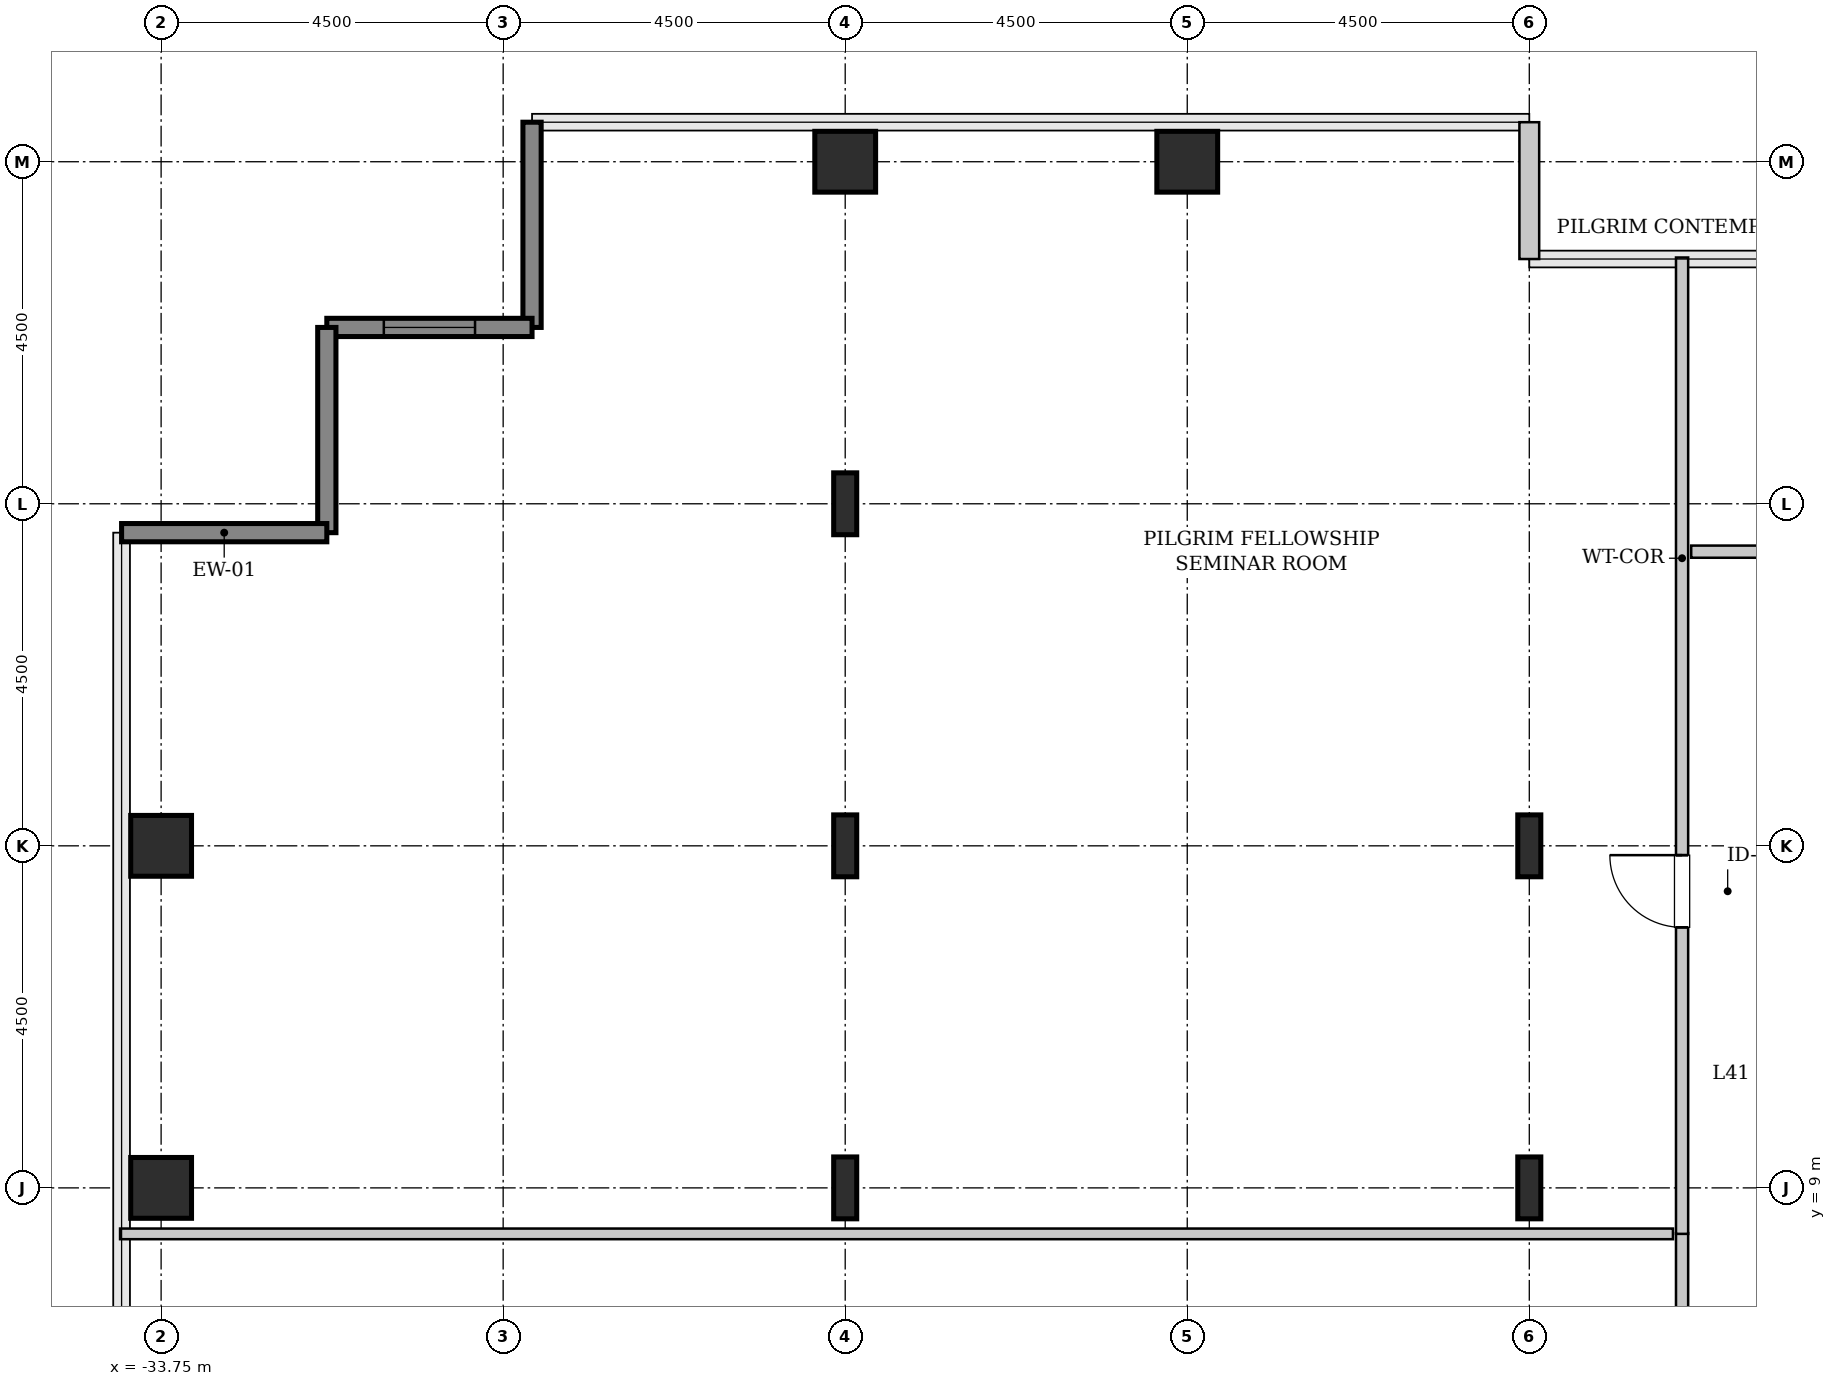
"""IFC4 building model, lengths in metres.
Left out: names, types, materials, properties, quantities, classifications, styles, units other than length and angle.
Written with IfcOpenShell. Run it as: python <this file> out.ifc"""

import sys

from ifc_helpers import new_model, si_unit, direction, frame, frame_2d, origin, origin_2d, place, context, subcontext, project, spatial, rectangle, hollow_rectangle, i_section, extrude, source, transform, mapped, element, fill, save


model = new_model("IFC4")
c1 = context("Model", 3, precision=1e-05, world=origin(), true_north=direction((0.0, 1.0)))
c2 = subcontext(c1, "Body", "Model", "MODEL_VIEW")
j1 = project(units=[si_unit("LENGTHUNIT", "METRE"), si_unit("PLANEANGLEUNIT", "RADIAN")], contexts=[c1])
p1 = place(None, origin())
s1 = spatial("IfcSite", under=j1, at=p1, CompositionType="ELEMENT")
p2 = place(p1, origin())
s2 = spatial("IfcBuilding", under=s1, at=p2, CompositionType="ELEMENT")
p3 = place(p2, frame((0.0, 0.0, 167.8)))
s3 = spatial("IfcBuildingStorey", under=s2, at=p3, CompositionType="ELEMENT", Elevation=167.8)
m1 = source(origin(), c2, "Body", "SweptSolid", [
    extrude(hollow_rectangle(XDim=0.8, YDim=0.8, WallThickness=0.04, InnerFilletRadius=0.04, OuterFilletRadius=0.08, at=origin_2d()), origin(), (0.0, 0.0, 1.0), 3.8),
])
for number, where, z_axis, x_axis in (
    (1, (-33.75, 9.0, 0.0), (0.0, 0.0, 1.0), (1.0, 0.0, 0.0)),
    (2, (-33.75, 13.5, 0.0), (0.0, 0.0, 1.0), (1.0, 0.0, 0.0)),
):
    element("IfcColumn", number, at=place(p3, frame(where, z_axis=z_axis, x_axis=x_axis)), inside=s3, PredefinedType="COLUMN", context=c2, shape_type="MappedRepresentation", body=[
        mapped(m1, transform((0.0, 0.0, 0.0), x_axis=(1.0, 0.0, 0.0), y_axis=(0.0, 1.0, 0.0), z_axis=(0.0, 0.0, 1.0), scale=1.0)),
    ])
m2 = source(origin(), c2, "Body", "SweptSolid", [
    extrude(i_section(OverallWidth=0.303, OverallDepth=0.814, WebThickness=0.021, FlangeThickness=0.04, FilletRadius=0.03, at=origin_2d()), origin(), (0.0, 0.0, 1.0), 3.8),
])
for number, where, z_axis, x_axis in (
    (3, (-24.75, 9.0, 0.0), (0.0, 0.0, 1.0), (1.0, 0.0, 0.0)),
    (4, (-24.75, 13.5, 0.0), (0.0, 0.0, 1.0), (1.0, 0.0, 0.0)),
    (5, (-24.75, 18.0, 0.0), (0.0, 0.0, 1.0), (1.0, 0.0, 0.0)),
):
    element("IfcColumn", number, at=place(p3, frame(where, z_axis=z_axis, x_axis=x_axis)), inside=s3, PredefinedType="COLUMN", context=c2, shape_type="MappedRepresentation", body=[
        mapped(m2, transform((0.0, 0.0, 0.0), x_axis=(1.0, 0.0, 0.0), y_axis=(0.0, 1.0, 0.0), z_axis=(0.0, 0.0, 1.0), scale=1.0)),
    ])
for number, where, z_axis, x_axis in (
    (6, (-24.75, 22.5, 0.0), (0.0, 0.0, 1.0), (1.0, 0.0, 0.0)),
    (7, (-20.25, 22.5, 0.0), (0.0, 0.0, 1.0), (1.0, 0.0, 0.0)),
):
    element("IfcColumn", number, at=place(p3, frame(where, z_axis=z_axis, x_axis=x_axis)), inside=s3, PredefinedType="COLUMN", context=c2, shape_type="MappedRepresentation", body=[
        mapped(m1, transform((0.0, 0.0, 0.0), x_axis=(1.0, 0.0, 0.0), y_axis=(0.0, 1.0, 0.0), z_axis=(0.0, 0.0, 1.0), scale=1.0)),
    ])
for number, where, z_axis, x_axis in (
    (8, (-15.75, 9.0, 0.0), (0.0, 0.0, 1.0), (1.0, 0.0, 0.0)),
    (9, (-15.75, 13.5, 0.0), (0.0, 0.0, 1.0), (1.0, 0.0, 0.0)),
):
    element("IfcColumn", number, at=place(p3, frame(where, z_axis=z_axis, x_axis=x_axis)), inside=s3, PredefinedType="COLUMN", context=c2, shape_type="MappedRepresentation", body=[
        mapped(m2, transform((0.0, 0.0, 0.0), x_axis=(1.0, 0.0, 0.0), y_axis=(0.0, 1.0, 0.0), z_axis=(0.0, 0.0, 1.0), scale=1.0)),
    ])
m3 = source(origin(), c2, "Body", "SweptSolid", [
    extrude(rectangle(XDim=1.8, YDim=0.26, at=frame_2d((0.9, 0.0))), origin(), (0.0, 0.0, 1.0), 3.55),
])
p4 = place(p3, frame((-15.75, 21.22, 0.0), z_axis=(0.0, 0.0, 1.0), x_axis=(0.0, 1.0, 0.0)))
e10 = element("IfcWall", 10, at=p4, inside=s3, PredefinedType="SOLIDWALL", context=c2, shape_type="MappedRepresentation", body=[
    mapped(m3, transform((0.0, 0.0, 0.0), x_axis=(1.0, 0.0, 0.0), y_axis=(0.0, 1.0, 0.0), z_axis=(0.0, 0.0, 1.0), scale=1.0)),
])
m4 = source(origin(), c2, "Body", "SweptSolid", [
    extrude(rectangle(XDim=2.7, YDim=0.24, at=frame_2d((1.35, 0.0))), origin(), (0.0, 0.0, 1.0), 3.55),
])
p5 = place(p3, frame((-28.87, 23.02, 0.0), z_axis=(0.0, 0.0, 1.0), x_axis=(0.0, -1.0, 0.0)))
e11 = element("IfcWall", 11, at=p5, inside=s3, PredefinedType="SHEAR", context=c2, shape_type="MappedRepresentation", body=[
    mapped(m4, transform((0.0, 0.0, 0.0), x_axis=(1.0, 0.0, 0.0), y_axis=(0.0, 1.0, 0.0), z_axis=(0.0, 0.0, 1.0), scale=1.0)),
])
p6 = place(p3, frame((-28.87, 20.32, 0.0), z_axis=(0.0, 0.0, 1.0), x_axis=(-1.0, 0.0, 0.0)))
e12 = element("IfcWall", 12, at=p6, inside=s3, PredefinedType="SHEAR", context=c2, shape_type="MappedRepresentation", body=[
    mapped(m4, transform((0.0, 0.0, 0.0), x_axis=(1.0, 0.0, 0.0), y_axis=(0.0, 1.0, 0.0), z_axis=(0.0, 0.0, 1.0), scale=1.0)),
])
p7 = place(p6, frame((0.75, 0.0, 0.85)))
e13 = element("IfcOpeningElement", 13, at=p7, cuts=e12, PredefinedType="OPENING", context=c2, shape_type="SweptSolid", body=[
    extrude(rectangle(XDim=1.2, YDim=1.8, at=frame_2d((0.6, 0.9))), frame((0.0, 0.13, 0.0), z_axis=(0.0, -1.0, 0.0), x_axis=(1.0, 0.0, 0.0)), (0.0, 0.0, 1.0), 0.26),
])
for number, where, z_axis, x_axis in (
    (14, (-31.57, 20.32, 0.0), (0.0, 0.0, 1.0), (0.0, -1.0, 0.0)),
    (15, (-31.57, 17.62, 0.0), (0.0, 0.0, 1.0), (-1.0, 0.0, 0.0)),
):
    element("IfcWall", number, at=place(p3, frame(where, z_axis=z_axis, x_axis=x_axis)), inside=s3, PredefinedType="SHEAR", context=c2, shape_type="MappedRepresentation", body=[
        mapped(m4, transform((0.0, 0.0, 0.0), x_axis=(1.0, 0.0, 0.0), y_axis=(0.0, 1.0, 0.0), z_axis=(0.0, 0.0, 1.0), scale=1.0)),
    ])
m5 = source(origin(), c2, "Body", "SweptSolid", [
    extrude(rectangle(XDim=3.61, YDim=0.16, at=frame_2d((1.805, 0.0))), origin(), (0.0, 0.0, 1.0), 3.535),
])
p8 = place(p3, frame((-13.74, 4.795, 0.0), z_axis=(0.0, 0.0, 1.0), x_axis=(0.0, 1.0, 0.0)))
e16 = element("IfcWall", 16, at=p8, inside=s3, PredefinedType="PARTITIONING", context=c2, shape_type="MappedRepresentation", body=[
    mapped(m5, transform((0.0, 0.0, 0.0), x_axis=(1.0, 0.0, 0.0), y_axis=(0.0, 1.0, 0.0), z_axis=(0.0, 0.0, 1.0), scale=1.0)),
])
p9 = place(p8, frame((1.33, 0.0, 0.0)))
e17 = element("IfcOpeningElement", 17, at=p9, cuts=e16, PredefinedType="OPENING", context=c2, shape_type="SweptSolid", body=[
    extrude(rectangle(XDim=0.95, YDim=2.1, at=frame_2d((0.475, 1.05))), frame((0.0, 0.09, 0.0), z_axis=(0.0, -1.0, 0.0), x_axis=(1.0, 0.0, 0.0)), (0.0, 0.0, 1.0), 0.18),
])
m6 = source(origin(), c2, "Body", "SweptSolid", [
    extrude(rectangle(XDim=20.43, YDim=0.14, at=frame_2d((10.215, 0.0))), origin(), (0.0, 0.0, 1.0), 3.535),
])
p10 = place(p3, frame((-34.29, 8.395, 0.0), z_axis=(0.0, 0.0, 1.0), x_axis=(1.0, 0.0, 0.0)))
e18 = element("IfcWall", 18, at=p10, inside=s3, PredefinedType="PARTITIONING", context=c2, shape_type="MappedRepresentation", body=[
    mapped(m6, transform((0.0, 0.0, 0.0), x_axis=(1.0, 0.0, 0.0), y_axis=(0.0, 1.0, 0.0), z_axis=(0.0, 0.0, 1.0), scale=1.0)),
])
m7 = source(origin(), c2, "Body", "SweptSolid", [
    extrude(rectangle(XDim=12.845, YDim=0.16, at=frame_2d((6.422, 0.0))), origin(), (0.0, 0.0, 1.0), 3.535),
])
p11 = place(p3, frame((-13.74, 8.395, 0.0), z_axis=(0.0, 0.0, 1.0), x_axis=(0.0, 1.0, 0.0)))
e19 = element("IfcWall", 19, at=p11, inside=s3, PredefinedType="PARTITIONING", context=c2, shape_type="MappedRepresentation", body=[
    mapped(m7, transform((0.0, 0.0, 0.0), x_axis=(1.0, 0.0, 0.0), y_axis=(0.0, 1.0, 0.0), z_axis=(0.0, 0.0, 1.0), scale=1.0)),
])
p12 = place(p11, frame((4.032, 0.0, 0.0)))
e20 = element("IfcOpeningElement", 20, at=p12, cuts=e19, PredefinedType="OPENING", context=c2, shape_type="SweptSolid", body=[
    extrude(rectangle(XDim=0.95, YDim=2.1, at=frame_2d((0.475, 1.05))), frame((0.0, 0.09, 0.0), z_axis=(0.0, -1.0, 0.0), x_axis=(1.0, 0.0, 0.0)), (0.0, 0.0, 1.0), 0.18),
])
m8 = source(origin(), c2, "Body", "SweptSolid", [
    extrude(rectangle(XDim=4.16, YDim=0.16, at=frame_2d((2.08, 0.0))), origin(), (0.0, 0.0, 1.0), 3.535),
])
p13 = place(p3, frame((-13.62, 17.37, 0.0), z_axis=(0.0, 0.0, 1.0), x_axis=(1.0, 0.0, 0.0)))
e21 = element("IfcWall", 21, at=p13, inside=s3, PredefinedType="PARTITIONING", context=c2, shape_type="MappedRepresentation", body=[
    mapped(m8, transform((0.0, 0.0, 0.0), x_axis=(1.0, 0.0, 0.0), y_axis=(0.0, 1.0, 0.0), z_axis=(0.0, 0.0, 1.0), scale=1.0)),
])
p14 = place(p13, frame((0.969, 0.0, 0.0)))
e22 = element("IfcOpeningElement", 22, at=p14, cuts=e21, PredefinedType="OPENING", context=c2, shape_type="SweptSolid", body=[
    extrude(rectangle(XDim=0.95, YDim=2.1, at=frame_2d((0.475, 1.05))), frame((0.0, 0.09, 0.0), z_axis=(0.0, -1.0, 0.0), x_axis=(1.0, 0.0, 0.0)), (0.0, 0.0, 1.0), 0.18),
])
m9 = source(origin(), c2, "Body", "SweptSolid", [
    extrude(rectangle(XDim=1.2, YDim=1.8, at=frame_2d((0.6, 0.9))), frame((0.0, 0.03, 0.0), z_axis=(0.0, -1.0, 0.0), x_axis=(1.0, 0.0, 0.0)), (0.0, 0.0, 1.0), 0.06),
])
p15 = place(p7, origin())
e23 = element("IfcWindow", 23, at=p15, inside=s3, PartitioningType="SINGLE_PANEL", PredefinedType="WINDOW", context=c2, shape_type="MappedRepresentation", body=[
    mapped(m9, transform((0.0, 0.0, 0.0), x_axis=(1.0, 0.0, 0.0), y_axis=(0.0, 1.0, 0.0), z_axis=(0.0, 0.0, 1.0), scale=1.0)),
])
fill(e13, e23)
m10 = source(origin(), c2, "Body", "SweptSolid", [
    extrude(rectangle(XDim=0.95, YDim=2.1, at=frame_2d((0.475, 1.05))), frame((0.0, 0.025, 0.0), z_axis=(0.0, -1.0, 0.0), x_axis=(1.0, 0.0, 0.0)), (0.0, 0.0, 1.0), 0.05),
])
p16 = place(p12, origin())
e24 = element("IfcDoor", 24, at=p16, inside=s3, OperationType="SINGLE_SWING_RIGHT", PredefinedType="DOOR", context=c2, shape_type="MappedRepresentation", body=[
    mapped(m10, transform((0.0, 0.0, 0.0), x_axis=(1.0, 0.0, 0.0), y_axis=(0.0, 1.0, 0.0), z_axis=(0.0, 0.0, 1.0), scale=1.0)),
])
fill(e20, e24)
save(model, sys.argv[1])
